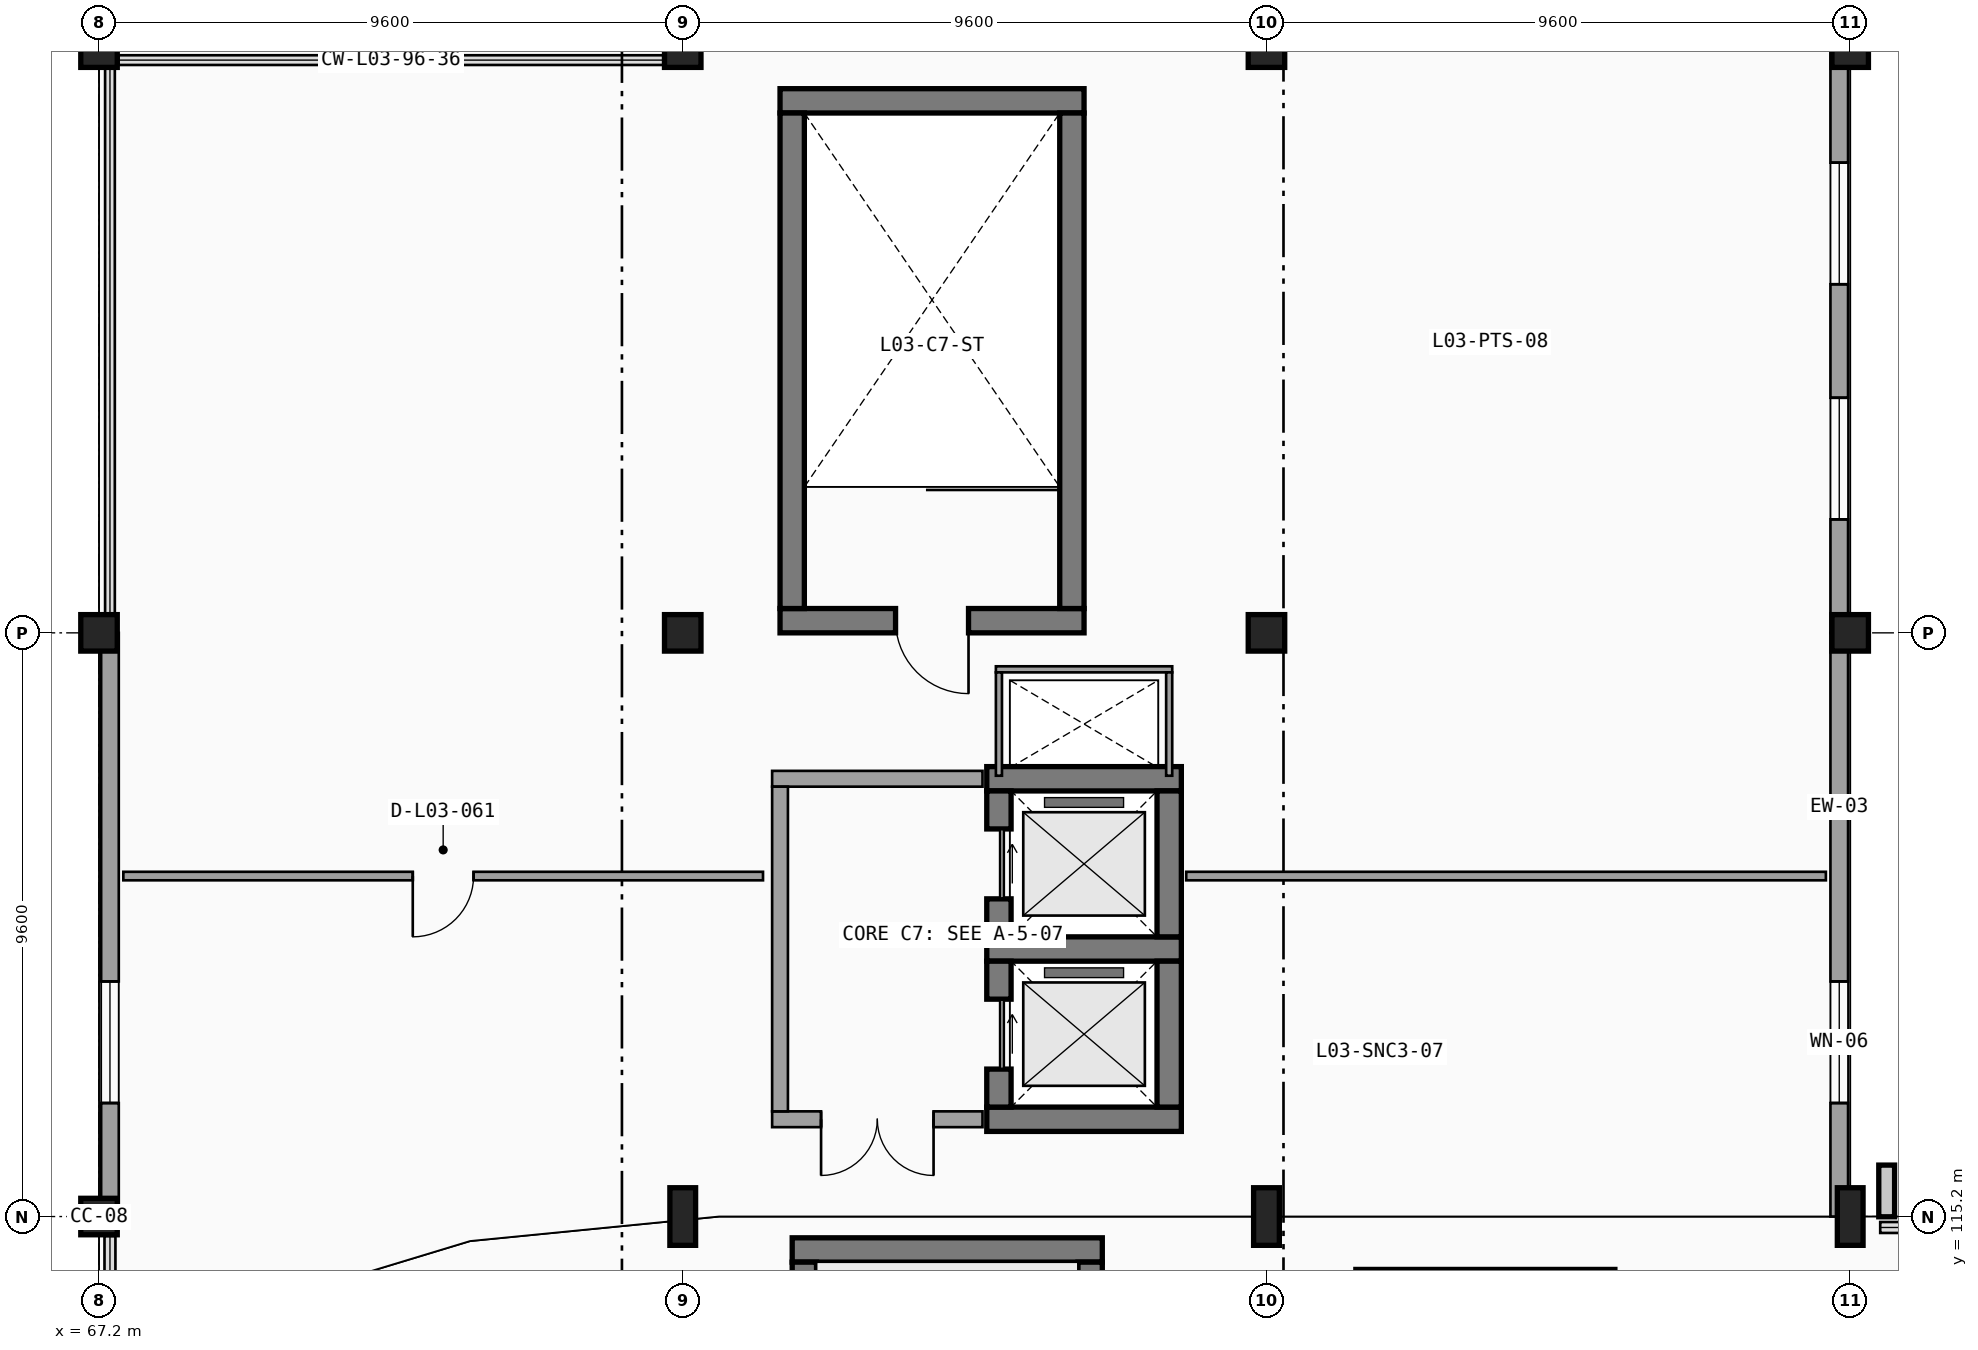
"""IFC4 building model, lengths in metres.
Left out: names, types, materials, properties, quantities, classifications, styles, units other than length and angle.
Written with IfcOpenShell. Run it as: python <this file> out.ifc"""

import sys

from ifc_helpers import new_model, si_unit, direction, frame, frame_2d, origin, origin_2d, place, context, subcontext, project, spatial, rectangle, i_section, extrude, element, fill, save


model = new_model("IFC4")
c1 = context("Model", 3, precision=1e-05, world=origin(), true_north=direction((0.0, 1.0)))
c2 = subcontext(c1, "Body", "Model", "MODEL_VIEW")
j1 = project(units=[si_unit("LENGTHUNIT", "METRE"), si_unit("PLANEANGLEUNIT", "RADIAN")], contexts=[c1])
p1 = place(None, origin())
s1 = spatial("IfcSite", under=j1, at=p1, CompositionType="ELEMENT")
p2 = place(p1, origin())
s2 = spatial("IfcBuilding", under=s1, at=p2, CompositionType="ELEMENT")
p3 = place(p2, frame((0.0, 0.0, 14.1)))
s3 = spatial("IfcBuildingStorey", under=s2, at=p3, CompositionType="ELEMENT", Elevation=14.1)
for number, where, z_axis, x_axis in (
    (1, (67.2, 115.2, 0.0), (0.0, 0.0, 1.0), (1.0, 0.0, 0.0)),
    (2, (67.2, 124.8, 0.0), (0.0, 0.0, 1.0), (1.0, 0.0, 0.0)),
    (3, (67.2, 134.4, 0.0), (0.0, 0.0, 1.0), (1.0, 0.0, 0.0)),
):
    element("IfcColumn", number, at=place(p3, frame(where, z_axis=z_axis, x_axis=x_axis)), inside=s3, PredefinedType="COLUMN", context=c2, shape_type="SweptSolid", body=[
        extrude(rectangle(XDim=0.6, YDim=0.6, at=origin_2d()), origin(), (0.0, 0.0, 1.0), 4.5),
    ])
p4 = place(p3, frame((76.8, 115.2, 0.0), z_axis=(0.0, 0.0, 1.0), x_axis=(1.0, 0.0, 0.0)))
e4 = element("IfcColumn", 4, at=p4, inside=s3, PredefinedType="COLUMN", context=c2, shape_type="SweptSolid", body=[
    extrude(i_section(OverallWidth=0.423, OverallDepth=0.948, WebThickness=0.024, FlangeThickness=0.043, FilletRadius=0.024, at=origin_2d()), origin(), (0.0, 0.0, 1.0), 4.5),
])
for number, where, z_axis, x_axis in (
    (5, (76.8, 124.8, 0.0), (0.0, 0.0, 1.0), (1.0, 0.0, 0.0)),
    (6, (76.8, 134.4, 0.0), (0.0, 0.0, 1.0), (1.0, 0.0, 0.0)),
):
    element("IfcColumn", number, at=place(p3, frame(where, z_axis=z_axis, x_axis=x_axis)), inside=s3, PredefinedType="COLUMN", context=c2, shape_type="SweptSolid", body=[
        extrude(rectangle(XDim=0.6, YDim=0.6, at=origin_2d()), origin(), (0.0, 0.0, 1.0), 4.5),
    ])
p5 = place(p3, frame((86.4, 115.2, 0.0), z_axis=(0.0, 0.0, 1.0), x_axis=(1.0, 0.0, 0.0)))
e7 = element("IfcColumn", 7, at=p5, inside=s3, PredefinedType="COLUMN", context=c2, shape_type="SweptSolid", body=[
    extrude(i_section(OverallWidth=0.423, OverallDepth=0.948, WebThickness=0.024, FlangeThickness=0.043, FilletRadius=0.024, at=origin_2d()), origin(), (0.0, 0.0, 1.0), 4.5),
])
for number, where, z_axis, x_axis in (
    (8, (86.4, 124.8, 0.0), (0.0, 0.0, 1.0), (1.0, 0.0, 0.0)),
    (9, (86.4, 134.4, 0.0), (0.0, 0.0, 1.0), (1.0, 0.0, 0.0)),
):
    element("IfcColumn", number, at=place(p3, frame(where, z_axis=z_axis, x_axis=x_axis)), inside=s3, PredefinedType="COLUMN", context=c2, shape_type="SweptSolid", body=[
        extrude(rectangle(XDim=0.6, YDim=0.6, at=origin_2d()), origin(), (0.0, 0.0, 1.0), 4.5),
    ])
p6 = place(p3, frame((96.0, 115.2, 0.0), z_axis=(0.0, 0.0, 1.0), x_axis=(1.0, 0.0, 0.0)))
e10 = element("IfcColumn", 10, at=p6, inside=s3, PredefinedType="COLUMN", context=c2, shape_type="SweptSolid", body=[
    extrude(i_section(OverallWidth=0.423, OverallDepth=0.948, WebThickness=0.024, FlangeThickness=0.043, FilletRadius=0.024, at=origin_2d()), origin(), (0.0, 0.0, 1.0), 4.5),
])
for number, where, z_axis, x_axis in (
    (11, (96.0, 124.8, 0.0), (0.0, 0.0, 1.0), (1.0, 0.0, 0.0)),
    (12, (96.0, 134.4, 0.0), (0.0, 0.0, 1.0), (1.0, 0.0, 0.0)),
):
    element("IfcColumn", number, at=place(p3, frame(where, z_axis=z_axis, x_axis=x_axis)), inside=s3, PredefinedType="COLUMN", context=c2, shape_type="SweptSolid", body=[
        extrude(rectangle(XDim=0.6, YDim=0.6, at=origin_2d()), origin(), (0.0, 0.0, 1.0), 4.5),
    ])
p7 = place(p3, frame((95.82, 115.2, 0.0), z_axis=(0.0, 0.0, 1.0), x_axis=(0.0, 1.0, 0.0)))
e13 = element("IfcWall", 13, at=p7, inside=s3, PredefinedType="SOLIDWALL", context=c2, shape_type="SweptSolid", body=[
    extrude(rectangle(XDim=9.6, YDim=0.29, at=frame_2d((4.8, 0.0))), origin(), (0.0, 0.0, 1.0), 3.313),
])
p8 = place(p7, frame((3.867, 0.0, 0.95), z_axis=(0.0, 0.0, 1.0), x_axis=(-1.0, 0.0, 0.0)))
e14 = element("IfcOpeningElement", 14, at=p8, cuts=e13, PredefinedType="OPENING", context=c2, shape_type="SweptSolid", body=[
    extrude(rectangle(XDim=2.0, YDim=2.0, at=frame_2d((1.0, 1.0))), frame((0.0, 0.155, 0.0), z_axis=(0.0, -1.0, 0.0), x_axis=(1.0, 0.0, 0.0)), (0.0, 0.0, 1.0), 0.31),
])
p9 = place(p3, frame((95.82, 124.8, 0.0), z_axis=(0.0, 0.0, 1.0), x_axis=(0.0, 1.0, 0.0)))
e15 = element("IfcWall", 15, at=p9, inside=s3, PredefinedType="SOLIDWALL", context=c2, shape_type="SweptSolid", body=[
    extrude(rectangle(XDim=9.6, YDim=0.29, at=frame_2d((4.8, 0.0))), origin(), (0.0, 0.0, 1.0), 3.638),
])
p10 = place(p9, frame((3.867, 0.0, 0.95), z_axis=(0.0, 0.0, 1.0), x_axis=(-1.0, 0.0, 0.0)))
e16 = element("IfcOpeningElement", 16, at=p10, cuts=e15, PredefinedType="OPENING", context=c2, shape_type="SweptSolid", body=[
    extrude(rectangle(XDim=2.0, YDim=2.0, at=frame_2d((1.0, 1.0))), frame((0.0, 0.155, 0.0), z_axis=(0.0, -1.0, 0.0), x_axis=(1.0, 0.0, 0.0)), (0.0, 0.0, 1.0), 0.31),
])
p11 = place(p9, frame((7.733, 0.0, 0.95), z_axis=(0.0, 0.0, 1.0), x_axis=(-1.0, 0.0, 0.0)))
e17 = element("IfcOpeningElement", 17, at=p11, cuts=e15, PredefinedType="OPENING", context=c2, shape_type="SweptSolid", body=[
    extrude(rectangle(XDim=2.0, YDim=2.0, at=frame_2d((1.0, 1.0))), frame((0.0, 0.155, 0.0), z_axis=(0.0, -1.0, 0.0), x_axis=(1.0, 0.0, 0.0)), (0.0, 0.0, 1.0), 0.31),
])
p12 = place(p3, frame((67.38, 124.8, 0.0), z_axis=(0.0, 0.0, 1.0), x_axis=(0.0, -1.0, 0.0)))
e18 = element("IfcWall", 18, at=p12, inside=s3, PredefinedType="SOLIDWALL", context=c2, shape_type="SweptSolid", body=[
    extrude(rectangle(XDim=9.6, YDim=0.29, at=frame_2d((4.8, 0.0))), origin(), (0.0, 0.0, 1.0), 3.638),
])
p13 = place(p12, frame((7.733, 0.0, 0.95), z_axis=(0.0, 0.0, 1.0), x_axis=(-1.0, 0.0, 0.0)))
e19 = element("IfcOpeningElement", 19, at=p13, cuts=e18, PredefinedType="OPENING", context=c2, shape_type="SweptSolid", body=[
    extrude(rectangle(XDim=2.0, YDim=2.0, at=frame_2d((1.0, 1.0))), frame((0.0, 0.155, 0.0), z_axis=(0.0, -1.0, 0.0), x_axis=(1.0, 0.0, 0.0)), (0.0, 0.0, 1.0), 0.31),
])
p14 = place(p3, frame((78.4, 125.0, 0.0), z_axis=(0.0, 0.0, 1.0), x_axis=(1.0, 0.0, 0.0)))
e20 = element("IfcWall", 20, at=p14, inside=s3, PredefinedType="SHEAR", context=c2, shape_type="SweptSolid", body=[
    extrude(rectangle(XDim=5.0, YDim=0.4, at=frame_2d((2.5, 0.0))), origin(), (0.0, 0.0, 1.0), 4.24),
])
p15 = place(p14, frame((3.1, 0.0, 0.0), z_axis=(0.0, 0.0, 1.0), x_axis=(-1.0, 0.0, 0.0)))
e21 = element("IfcOpeningElement", 21, at=p15, cuts=e20, PredefinedType="OPENING", context=c2, shape_type="SweptSolid", body=[
    extrude(rectangle(XDim=1.2, YDim=2.2, at=frame_2d((0.6, 1.1))), frame((0.0, 0.21, 0.0), z_axis=(0.0, -1.0, 0.0), x_axis=(1.0, 0.0, 0.0)), (0.0, 0.0, 1.0), 0.42),
])
p16 = place(p3, frame((83.4, 133.55, 0.0), z_axis=(0.0, 0.0, 1.0), x_axis=(-1.0, 0.0, 0.0)))
e22 = element("IfcWall", 22, at=p16, inside=s3, PredefinedType="SHEAR", context=c2, shape_type="SweptSolid", body=[
    extrude(rectangle(XDim=5.0, YDim=0.4, at=frame_2d((2.5, 0.0))), origin(), (0.0, 0.0, 1.0), 4.24),
])
for number, where, z_axis, x_axis in (
    (23, (78.6, 133.35, 0.0), (0.0, 0.0, 1.0), (0.0, -1.0, 0.0)),
    (24, (83.2, 125.2, 0.0), (0.0, 0.0, 1.0), (0.0, 1.0, 0.0)),
):
    element("IfcWall", number, at=place(p3, frame(where, z_axis=z_axis, x_axis=x_axis)), inside=s3, PredefinedType="SHEAR", context=c2, shape_type="SweptSolid", body=[
        extrude(rectangle(XDim=8.15, YDim=0.4, at=frame_2d((4.075, 0.0))), origin(), (0.0, 0.0, 1.0), 4.24),
    ])
for number, where, z_axis, x_axis in (
    (25, (81.8, 116.8, 0.0), (0.0, 0.0, 1.0), (1.0, 0.0, 0.0)),
    (26, (85.0, 119.6, 0.0), (0.0, 0.0, 1.0), (-1.0, 0.0, 0.0)),
):
    element("IfcWall", number, at=place(p3, frame(where, z_axis=z_axis, x_axis=x_axis)), inside=s3, PredefinedType="SHEAR", context=c2, shape_type="SweptSolid", body=[
        extrude(rectangle(XDim=3.2, YDim=0.4, at=frame_2d((1.6, 0.0))), origin(), (0.0, 0.0, 1.0), 4.24),
    ])
p17 = place(p3, frame((82.0, 119.4, 0.0), z_axis=(0.0, 0.0, 1.0), x_axis=(0.0, -1.0, 0.0)))
e27 = element("IfcWall", 27, at=p17, inside=s3, PredefinedType="SHEAR", context=c2, shape_type="SweptSolid", body=[
    extrude(rectangle(XDim=2.4, YDim=0.4, at=frame_2d((1.2, 0.0))), origin(), (0.0, 0.0, 1.0), 4.24),
])
p18 = place(p17, frame((0.625, 0.0, 0.0), z_axis=(0.0, 0.0, 1.0), x_axis=(1.0, 0.0, 0.0)))
e28 = element("IfcOpeningElement", 28, at=p18, cuts=e27, PredefinedType="OPENING", context=c2, shape_type="SweptSolid", body=[
    extrude(rectangle(XDim=1.15, YDim=2.2, at=frame_2d((0.575, 1.1))), frame((0.0, 0.21, 0.0), z_axis=(0.0, -1.0, 0.0), x_axis=(1.0, 0.0, 0.0)), (0.0, 0.0, 1.0), 0.42),
])
p19 = place(p3, frame((84.8, 117.0, 0.0), z_axis=(0.0, 0.0, 1.0), x_axis=(0.0, 1.0, 0.0)))
e29 = element("IfcWall", 29, at=p19, inside=s3, PredefinedType="SHEAR", context=c2, shape_type="SweptSolid", body=[
    extrude(rectangle(XDim=2.4, YDim=0.4, at=frame_2d((1.2, 0.0))), origin(), (0.0, 0.0, 1.0), 4.24),
])
p20 = place(p3, frame((85.0, 122.4, 0.0), z_axis=(0.0, 0.0, 1.0), x_axis=(-1.0, 0.0, 0.0)))
e30 = element("IfcWall", 30, at=p20, inside=s3, PredefinedType="SHEAR", context=c2, shape_type="SweptSolid", body=[
    extrude(rectangle(XDim=3.2, YDim=0.4, at=frame_2d((1.6, 0.0))), origin(), (0.0, 0.0, 1.0), 4.24),
])
p21 = place(p3, frame((82.0, 122.2, 0.0), z_axis=(0.0, 0.0, 1.0), x_axis=(0.0, -1.0, 0.0)))
e31 = element("IfcWall", 31, at=p21, inside=s3, PredefinedType="SHEAR", context=c2, shape_type="SweptSolid", body=[
    extrude(rectangle(XDim=2.4, YDim=0.4, at=frame_2d((1.2, 0.0))), origin(), (0.0, 0.0, 1.0), 4.24),
])
p22 = place(p21, frame((0.625, 0.0, 0.0), z_axis=(0.0, 0.0, 1.0), x_axis=(1.0, 0.0, 0.0)))
e32 = element("IfcOpeningElement", 32, at=p22, cuts=e31, PredefinedType="OPENING", context=c2, shape_type="SweptSolid", body=[
    extrude(rectangle(XDim=1.15, YDim=2.2, at=frame_2d((0.575, 1.1))), frame((0.0, 0.21, 0.0), z_axis=(0.0, -1.0, 0.0), x_axis=(1.0, 0.0, 0.0)), (0.0, 0.0, 1.0), 0.42),
])
p23 = place(p3, frame((84.8, 119.8, 0.0), z_axis=(0.0, 0.0, 1.0), x_axis=(0.0, 1.0, 0.0)))
e33 = element("IfcWall", 33, at=p23, inside=s3, PredefinedType="SHEAR", context=c2, shape_type="SweptSolid", body=[
    extrude(rectangle(XDim=2.4, YDim=0.4, at=frame_2d((1.2, 0.0))), origin(), (0.0, 0.0, 1.0), 4.24),
])
p24 = place(p3, frame((84.85, 124.2, 0.0), z_axis=(0.0, 0.0, 1.0), x_axis=(-1.0, 0.0, 0.0)))
e34 = element("IfcWall", 34, at=p24, inside=s3, PredefinedType="PARTITIONING", context=c2, shape_type="SweptSolid", body=[
    extrude(rectangle(XDim=2.9, YDim=0.1, at=frame_2d((1.45, 0.0))), origin(), (0.0, 0.0, 1.0), 4.24),
])
for number, where, z_axis, x_axis in (
    (35, (82.0, 124.15, 0.0), (0.0, 0.0, 1.0), (0.0, -1.0, 0.0)),
    (36, (84.8, 122.45, 0.0), (0.0, 0.0, 1.0), (0.0, 1.0, 0.0)),
):
    element("IfcWall", number, at=place(p3, frame(where, z_axis=z_axis, x_axis=x_axis)), inside=s3, PredefinedType="PARTITIONING", context=c2, shape_type="SweptSolid", body=[
        extrude(rectangle(XDim=1.7, YDim=0.1, at=frame_2d((0.85, 0.0))), origin(), (0.0, 0.0, 1.0), 4.24),
    ])
p25 = place(p3, frame((78.27, 116.8, 0.0), z_axis=(0.0, 0.0, 1.0), x_axis=(1.0, 0.0, 0.0)))
e37 = element("IfcWall", 37, at=p25, inside=s3, PredefinedType="SOLIDWALL", context=c2, shape_type="SweptSolid", body=[
    extrude(rectangle(XDim=3.46, YDim=0.26, at=frame_2d((1.73, 0.0))), origin(), (0.0, 0.0, 1.0), 4.24),
])
p26 = place(p25, frame((2.655, 0.0, 0.0), z_axis=(0.0, 0.0, 1.0), x_axis=(-1.0, 0.0, 0.0)))
e38 = element("IfcOpeningElement", 38, at=p26, cuts=e37, PredefinedType="OPENING", context=c2, shape_type="SweptSolid", body=[
    extrude(rectangle(XDim=1.85, YDim=2.25, at=frame_2d((0.925, 1.125))), frame((0.0, 0.14, 0.0), z_axis=(0.0, -1.0, 0.0), x_axis=(1.0, 0.0, 0.0)), (0.0, 0.0, 1.0), 0.28),
])
p27 = place(p3, frame((81.73, 122.4, 0.0), z_axis=(0.0, 0.0, 1.0), x_axis=(-1.0, 0.0, 0.0)))
e39 = element("IfcWall", 39, at=p27, inside=s3, PredefinedType="SOLIDWALL", context=c2, shape_type="SweptSolid", body=[
    extrude(rectangle(XDim=3.46, YDim=0.26, at=frame_2d((1.73, 0.0))), origin(), (0.0, 0.0, 1.0), 4.24),
])
p28 = place(p3, frame((78.4, 122.27, 0.0), z_axis=(0.0, 0.0, 1.0), x_axis=(0.0, -1.0, 0.0)))
e40 = element("IfcWall", 40, at=p28, inside=s3, PredefinedType="SOLIDWALL", context=c2, shape_type="SweptSolid", body=[
    extrude(rectangle(XDim=5.34, YDim=0.26, at=frame_2d((2.67, 0.0))), origin(), (0.0, 0.0, 1.0), 4.24),
])
p29 = place(p3, frame((83.7, 114.65, 0.0), z_axis=(0.0, 0.0, 1.0), x_axis=(-1.0, 0.0, 0.0)))
e41 = element("IfcWall", 41, at=p29, inside=s3, PredefinedType="SHEAR", context=c2, shape_type="SweptSolid", body=[
    extrude(rectangle(XDim=5.1, YDim=0.4, at=frame_2d((2.55, 0.0))), origin(), (0.0, 0.0, 1.0), 4.24),
])
for number, where, z_axis, x_axis in (
    (42, (78.8, 114.45, 0.0), (0.0, 0.0, 1.0), (0.0, -1.0, 0.0)),
    (43, (83.5, 106.3, 0.0), (0.0, 0.0, 1.0), (0.0, 1.0, 0.0)),
):
    element("IfcWall", number, at=place(p3, frame(where, z_axis=z_axis, x_axis=x_axis)), inside=s3, PredefinedType="SHEAR", context=c2, shape_type="SweptSolid", body=[
        extrude(rectangle(XDim=8.15, YDim=0.4, at=frame_2d((4.075, 0.0))), origin(), (0.0, 0.0, 1.0), 4.24),
    ])
p30 = place(p3, frame((92.13, 114.13, 0.0), z_axis=(0.0, 0.0, 1.0), x_axis=(-1.0, 0.0, 0.0)))
e44 = element("IfcWall", 44, at=p30, inside=s3, PredefinedType="SHEAR", context=c2, shape_type="SweptSolid", body=[
    extrude(rectangle(XDim=4.26, YDim=0.4, at=frame_2d((2.13, 0.0))), origin(), (0.0, 0.0, 1.0), 4.24),
])
p31 = place(p3, frame((95.6, 120.8, 0.0), z_axis=(0.0, 0.0, 1.0), x_axis=(-1.0, 0.0, 0.0)))
e45 = element("IfcWall", 45, at=p31, inside=s3, PredefinedType="PARTITIONING", context=c2, shape_type="SweptSolid", body=[
    extrude(rectangle(XDim=10.52, YDim=0.14, at=frame_2d((5.26, 0.0))), origin(), (0.0, 0.0, 1.0), 3.638),
])
p32 = place(p3, frame((78.12, 120.8, 0.0), z_axis=(0.0, 0.0, 1.0), x_axis=(-1.0, 0.0, 0.0)))
e46 = element("IfcWall", 46, at=p32, inside=s3, PredefinedType="PARTITIONING", context=c2, shape_type="SweptSolid", body=[
    extrude(rectangle(XDim=10.52, YDim=0.14, at=frame_2d((5.26, 0.0))), origin(), (0.0, 0.0, 1.0), 3.638),
])
p33 = place(p32, frame((4.76, 0.0, 0.0), z_axis=(0.0, 0.0, 1.0), x_axis=(1.0, 0.0, 0.0)))
e47 = element("IfcOpeningElement", 47, at=p33, cuts=e46, PredefinedType="OPENING", context=c2, shape_type="SweptSolid", body=[
    extrude(rectangle(XDim=1.0, YDim=2.2, at=frame_2d((0.5, 1.1))), frame((0.0, 0.08, 0.0), z_axis=(0.0, -1.0, 0.0), x_axis=(1.0, 0.0, 0.0)), (0.0, 0.0, 1.0), 0.16),
])
p34 = place(p8, origin())
e48 = element("IfcWindow", 48, at=p34, inside=s3, PartitioningType="SINGLE_PANEL", PredefinedType="WINDOW", context=c2, shape_type="SweptSolid", body=[
    extrude(rectangle(XDim=2.0, YDim=2.0, at=frame_2d((1.0, 1.0))), frame((0.0, 0.03, 0.0), z_axis=(0.0, -1.0, 0.0), x_axis=(1.0, 0.0, 0.0)), (0.0, 0.0, 1.0), 0.06),
])
fill(e14, e48)
p35 = place(p10, origin())
e49 = element("IfcWindow", 49, at=p35, inside=s3, PartitioningType="SINGLE_PANEL", PredefinedType="WINDOW", context=c2, shape_type="SweptSolid", body=[
    extrude(rectangle(XDim=2.0, YDim=2.0, at=frame_2d((1.0, 1.0))), frame((0.0, 0.03, 0.0), z_axis=(0.0, -1.0, 0.0), x_axis=(1.0, 0.0, 0.0)), (0.0, 0.0, 1.0), 0.06),
])
fill(e16, e49)
p36 = place(p11, origin())
e50 = element("IfcWindow", 50, at=p36, inside=s3, PartitioningType="SINGLE_PANEL", PredefinedType="WINDOW", context=c2, shape_type="SweptSolid", body=[
    extrude(rectangle(XDim=2.0, YDim=2.0, at=frame_2d((1.0, 1.0))), frame((0.0, 0.03, 0.0), z_axis=(0.0, -1.0, 0.0), x_axis=(1.0, 0.0, 0.0)), (0.0, 0.0, 1.0), 0.06),
])
fill(e17, e50)
p37 = place(p13, origin())
e51 = element("IfcWindow", 51, at=p37, inside=s3, PartitioningType="SINGLE_PANEL", PredefinedType="WINDOW", context=c2, shape_type="SweptSolid", body=[
    extrude(rectangle(XDim=2.0, YDim=2.0, at=frame_2d((1.0, 1.0))), frame((0.0, 0.03, 0.0), z_axis=(0.0, -1.0, 0.0), x_axis=(1.0, 0.0, 0.0)), (0.0, 0.0, 1.0), 0.06),
])
fill(e19, e51)
p38 = place(p15, origin())
e52 = element("IfcDoor", 52, at=p38, inside=s3, OperationType="SINGLE_SWING_LEFT", PredefinedType="DOOR", context=c2, shape_type="SweptSolid", body=[
    extrude(rectangle(XDim=1.2, YDim=2.2, at=frame_2d((0.6, 1.1))), frame((0.0, 0.025, 0.0), z_axis=(0.0, -1.0, 0.0), x_axis=(1.0, 0.0, 0.0)), (0.0, 0.0, 1.0), 0.05),
])
fill(e21, e52)
p39 = place(p18, origin())
e53 = element("IfcDoor", 53, at=p39, inside=s3, OperationType="SLIDING_TO_LEFT", PredefinedType="DOOR", context=c2, shape_type="SweptSolid", body=[
    extrude(rectangle(XDim=1.15, YDim=2.2, at=frame_2d((0.575, 1.1))), frame((0.0, 0.025, 0.0), z_axis=(0.0, -1.0, 0.0), x_axis=(1.0, 0.0, 0.0)), (0.0, 0.0, 1.0), 0.05),
])
fill(e28, e53)
p40 = place(p22, origin())
e54 = element("IfcDoor", 54, at=p40, inside=s3, OperationType="SLIDING_TO_LEFT", PredefinedType="DOOR", context=c2, shape_type="SweptSolid", body=[
    extrude(rectangle(XDim=1.15, YDim=2.2, at=frame_2d((0.575, 1.1))), frame((0.0, 0.025, 0.0), z_axis=(0.0, -1.0, 0.0), x_axis=(1.0, 0.0, 0.0)), (0.0, 0.0, 1.0), 0.05),
])
fill(e32, e54)
p41 = place(p26, origin())
e55 = element("IfcDoor", 55, at=p41, inside=s3, OperationType="DOUBLE_DOOR_SINGLE_SWING", PredefinedType="DOOR", context=c2, shape_type="SweptSolid", body=[
    extrude(rectangle(XDim=1.85, YDim=2.25, at=frame_2d((0.925, 1.125))), frame((0.0, 0.025, 0.0), z_axis=(0.0, -1.0, 0.0), x_axis=(1.0, 0.0, 0.0)), (0.0, 0.0, 1.0), 0.05),
])
fill(e38, e55)
p42 = place(p33, origin())
e56 = element("IfcDoor", 56, at=p42, inside=s3, OperationType="SINGLE_SWING_RIGHT", PredefinedType="DOOR", context=c2, shape_type="SweptSolid", body=[
    extrude(rectangle(XDim=1.0, YDim=2.2, at=frame_2d((0.5, 1.1))), frame((0.0, 0.025, 0.0), z_axis=(0.0, -1.0, 0.0), x_axis=(1.0, 0.0, 0.0)), (0.0, 0.0, 1.0), 0.05),
])
fill(e47, e56)
save(model, sys.argv[1])
